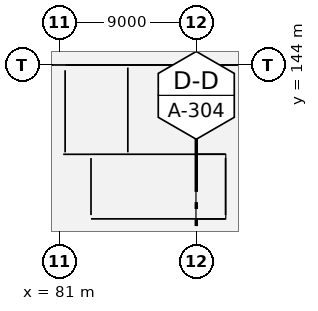
"""IFC4 building model, lengths in metres.
Left out: names, types, materials, properties, quantities, classifications, styles, units other than length and angle.
Written with IfcOpenShell. Run it as: python <this file> out.ifc"""

import sys

from ifc_helpers import new_model, si_unit, direction, frame, frame_2d, origin, origin_2d, place, context, subcontext, project, spatial, rectangle, extrude, element, fill, save


model = new_model("IFC4")
c1 = context("Model", 3, precision=1e-05, world=origin(), true_north=direction((0.0, 1.0)))
c2 = subcontext(c1, "Body", "Model", "MODEL_VIEW")
j1 = project(units=[si_unit("LENGTHUNIT", "METRE"), si_unit("PLANEANGLEUNIT", "RADIAN")], contexts=[c1])
p1 = place(None, origin())
s1 = spatial("IfcSite", under=j1, at=p1, CompositionType="ELEMENT")
p2 = place(p1, origin())
s2 = spatial("IfcBuilding", under=s1, at=p2, CompositionType="ELEMENT")
p3 = place(p2, origin())
s3 = spatial("IfcBuildingStorey", under=s2, at=p3, CompositionType="ELEMENT", Elevation=0.0)
for number, where, z_axis, x_axis in (
    (1, (81.0, 144.0, -0.5), (0.0, 0.0, 1.0), (1.0, 0.0, 0.0)),
    (2, (90.0, 144.0, -0.5), (0.0, 0.0, 1.0), (1.0, 0.0, 0.0)),
):
    element("IfcColumn", number, at=place(p3, frame(where, z_axis=z_axis, x_axis=x_axis)), inside=s3, PredefinedType="COLUMN", context=c2, shape_type="SweptSolid", body=[
        extrude(rectangle(XDim=0.8, YDim=0.7, at=origin_2d()), origin(), (0.0, 0.0, 1.0), 6.8),
    ])
p4 = place(p3, frame((72.575, 144.0, 0.0), z_axis=(0.0, 0.0, 1.0), x_axis=(1.0, 0.0, 0.0)))
e3 = element("IfcWall", 3, at=p4, inside=s3, PredefinedType="SOLIDWALL", context=c2, shape_type="SweptSolid", body=[
    extrude(rectangle(XDim=8.025, YDim=0.34, at=frame_2d((4.013, 0.0))), origin(), (0.0, 0.0, 1.0), 5.12),
])
p5 = place(p4, frame((2.812, 0.0, 0.0)))
e4 = element("IfcOpeningElement", 4, at=p5, cuts=e3, PredefinedType="OPENING", context=c2, shape_type="SweptSolid", body=[
    extrude(rectangle(XDim=2.4, YDim=3.1, at=frame_2d((1.2, 1.55))), frame((0.0, 0.18, 0.0), z_axis=(0.0, -1.0, 0.0), x_axis=(1.0, 0.0, 0.0)), (0.0, 0.0, 1.0), 0.36),
])
p6 = place(p3, frame((81.4, 144.0, 0.0), z_axis=(0.0, 0.0, 1.0), x_axis=(1.0, 0.0, 0.0)))
e5 = element("IfcWall", 5, at=p6, inside=s3, PredefinedType="SOLIDWALL", context=c2, shape_type="SweptSolid", body=[
    extrude(rectangle(XDim=8.2, YDim=0.34, at=frame_2d((4.1, 0.0))), origin(), (0.0, 0.0, 1.0), 5.12),
])
p7 = place(p6, frame((1.533, 0.0, 0.9)))
e6 = element("IfcOpeningElement", 6, at=p7, cuts=e5, PredefinedType="OPENING", context=c2, shape_type="SweptSolid", body=[
    extrude(rectangle(XDim=2.4, YDim=3.5, at=frame_2d((1.2, 1.75))), frame((0.0, 0.18, 0.0), z_axis=(0.0, -1.0, 0.0), x_axis=(1.0, 0.0, 0.0)), (0.0, 0.0, 1.0), 0.36),
])
p8 = place(p6, frame((4.267, 0.0, 0.9)))
e7 = element("IfcOpeningElement", 7, at=p8, cuts=e5, PredefinedType="OPENING", context=c2, shape_type="SweptSolid", body=[
    extrude(rectangle(XDim=2.4, YDim=3.5, at=frame_2d((1.2, 1.75))), frame((0.0, 0.18, 0.0), z_axis=(0.0, -1.0, 0.0), x_axis=(1.0, 0.0, 0.0)), (0.0, 0.0, 1.0), 0.36),
])
p9 = place(p6, frame((0.2, 0.0, 0.0)))
e8 = element("IfcOpeningElement", 8, at=p9, cuts=e5, PredefinedType="OPENING", context=c2, shape_type="SweptSolid", body=[
    extrude(rectangle(XDim=1.2, YDim=2.25, at=frame_2d((0.6, 1.125))), frame((0.0, 0.18, 0.0), z_axis=(0.0, -1.0, 0.0), x_axis=(1.0, 0.0, 0.0)), (0.0, 0.0, 1.0), 0.36),
])
p10 = place(p3, frame((90.4, 144.0, 0.0), z_axis=(0.0, 0.0, 1.0), x_axis=(1.0, 0.0, 0.0)))
e9 = element("IfcWall", 9, at=p10, inside=s3, PredefinedType="SOLIDWALL", context=c2, shape_type="SweptSolid", body=[
    extrude(rectangle(XDim=8.2, YDim=0.34, at=frame_2d((4.1, 0.0))), origin(), (0.0, 0.0, 1.0), 5.12),
])
p11 = place(p10, frame((2.9, 0.0, 0.0)))
e10 = element("IfcOpeningElement", 10, at=p11, cuts=e9, PredefinedType="OPENING", context=c2, shape_type="SweptSolid", body=[
    extrude(rectangle(XDim=2.4, YDim=3.1, at=frame_2d((1.2, 1.55))), frame((0.0, 0.18, 0.0), z_axis=(0.0, -1.0, 0.0), x_axis=(1.0, 0.0, 0.0)), (0.0, 0.0, 1.0), 0.36),
])
p12 = place(p3, frame((83.075, 133.875, -0.5), z_axis=(0.0, 0.0, 1.0), x_axis=(1.0, 0.0, 0.0)))
e11 = element("IfcWall", 11, at=p12, inside=s3, PredefinedType="SOLIDWALL", context=c2, shape_type="SweptSolid", body=[
    extrude(rectangle(XDim=8.85, YDim=0.25, at=frame_2d((4.425, 0.0))), origin(), (0.0, 0.0, 1.0), 6.8),
])
p13 = place(p3, frame((83.075, 138.125, -0.5), z_axis=(0.0, 0.0, 1.0), x_axis=(1.0, 0.0, 0.0)))
e12 = element("IfcWall", 12, at=p13, inside=s3, PredefinedType="SOLIDWALL", context=c2, shape_type="SweptSolid", body=[
    extrude(rectangle(XDim=8.85, YDim=0.25, at=frame_2d((4.425, 0.0))), origin(), (0.0, 0.0, 1.0), 6.8),
])
p14 = place(p13, frame((0.425, 0.0, 0.5)))
e13 = element("IfcOpeningElement", 13, at=p14, cuts=e12, PredefinedType="OPENING", context=c2, shape_type="SweptSolid", body=[
    extrude(rectangle(XDim=1.2, YDim=2.2, at=frame_2d((0.6, 1.1))), frame((0.0, 0.135, 0.0), z_axis=(0.0, -1.0, 0.0), x_axis=(1.0, 0.0, 0.0)), (0.0, 0.0, 1.0), 0.27),
])
p15 = place(p3, frame((83.075, 134.125, -0.5), z_axis=(0.0, 0.0, 1.0), x_axis=(0.0, 1.0, 0.0)))
e14 = element("IfcWall", 14, at=p15, inside=s3, PredefinedType="SOLIDWALL", context=c2, shape_type="SweptSolid", body=[
    extrude(rectangle(XDim=3.75, YDim=0.25, at=frame_2d((1.875, 0.0))), origin(), (0.0, 0.0, 1.0), 6.8),
])
p16 = place(p15, frame((1.1, 0.0, 0.5)))
e15 = element("IfcOpeningElement", 15, at=p16, cuts=e14, PredefinedType="OPENING", context=c2, shape_type="SweptSolid", body=[
    extrude(rectangle(XDim=1.2, YDim=2.2, at=frame_2d((0.6, 1.1))), frame((0.0, 0.135, 0.0), z_axis=(0.0, -1.0, 0.0), x_axis=(1.0, 0.0, 0.0)), (0.0, 0.0, 1.0), 0.27),
])
p17 = place(p3, frame((91.925, 134.125, -0.5), z_axis=(0.0, 0.0, 1.0), x_axis=(0.0, 1.0, 0.0)))
e16 = element("IfcWall", 16, at=p17, inside=s3, PredefinedType="SOLIDWALL", context=c2, shape_type="SweptSolid", body=[
    extrude(rectangle(XDim=3.75, YDim=0.25, at=frame_2d((1.875, 0.0))), origin(), (0.0, 0.0, 1.0), 6.8),
])
p18 = place(p3, frame((81.373, 138.25, 0.0), z_axis=(0.0, 0.0, 1.0), x_axis=(0.0, 1.0, 0.0)))
e17 = element("IfcWall", 17, at=p18, inside=s3, PredefinedType="STANDARD", context=c2, shape_type="SweptSolid", body=[
    extrude(rectangle(XDim=5.4, YDim=0.255, at=frame_2d((2.7, 0.0))), origin(), (0.0, 0.0, 1.0), 5.95),
])
p19 = place(p3, frame((85.498, 138.25, 0.0), z_axis=(0.0, 0.0, 1.0), x_axis=(0.0, 1.0, 0.0)))
e18 = element("IfcWall", 18, at=p19, inside=s3, PredefinedType="STANDARD", context=c2, shape_type="SweptSolid", body=[
    extrude(rectangle(XDim=5.58, YDim=0.255, at=frame_2d((2.79, 0.0))), origin(), (0.0, 0.0, 1.0), 5.95),
])
p20 = place(p3, frame((81.245, 138.123, 0.0), z_axis=(0.0, 0.0, 1.0), x_axis=(1.0, 0.0, 0.0)))
e19 = element("IfcWall", 19, at=p20, inside=s3, PredefinedType="STANDARD", context=c2, shape_type="SweptSolid", body=[
    extrude(rectangle(XDim=1.83, YDim=0.255, at=frame_2d((0.915, 0.0))), origin(), (0.0, 0.0, 1.0), 5.95),
])
p21 = place(p7, origin())
e20 = element("IfcWindow", 20, at=p21, inside=s3, PartitioningType="TRIPLE_PANEL_VERTICAL", PredefinedType="WINDOW", context=c2, shape_type="SweptSolid", body=[
    extrude(rectangle(XDim=2.4, YDim=3.5, at=frame_2d((1.2, 1.75))), frame((0.0, 0.03, 0.0), z_axis=(0.0, -1.0, 0.0), x_axis=(1.0, 0.0, 0.0)), (0.0, 0.0, 1.0), 0.06),
])
fill(e6, e20)
p22 = place(p8, origin())
e21 = element("IfcWindow", 21, at=p22, inside=s3, PartitioningType="TRIPLE_PANEL_VERTICAL", PredefinedType="WINDOW", context=c2, shape_type="SweptSolid", body=[
    extrude(rectangle(XDim=2.4, YDim=3.5, at=frame_2d((1.2, 1.75))), frame((0.0, 0.03, 0.0), z_axis=(0.0, -1.0, 0.0), x_axis=(1.0, 0.0, 0.0)), (0.0, 0.0, 1.0), 0.06),
])
fill(e7, e21)
p23 = place(p16, origin())
e22 = element("IfcDoor", 22, at=p23, inside=s3, OperationType="SINGLE_SWING_RIGHT", PredefinedType="DOOR", context=c2, shape_type="SweptSolid", body=[
    extrude(rectangle(XDim=1.2, YDim=2.2, at=frame_2d((0.6, 1.1))), frame((0.0, 0.025, 0.0), z_axis=(0.0, -1.0, 0.0), x_axis=(1.0, 0.0, 0.0)), (0.0, 0.0, 1.0), 0.05),
])
fill(e15, e22)
p24 = place(p14, origin())
e23 = element("IfcDoor", 23, at=p24, inside=s3, OperationType="SINGLE_SWING_LEFT", PredefinedType="DOOR", context=c2, shape_type="SweptSolid", body=[
    extrude(rectangle(XDim=1.2, YDim=2.2, at=frame_2d((0.6, 1.1))), frame((0.0, 0.025, 0.0), z_axis=(0.0, -1.0, 0.0), x_axis=(1.0, 0.0, 0.0)), (0.0, 0.0, 1.0), 0.05),
])
fill(e13, e23)
p25 = place(p9, origin())
e24 = element("IfcDoor", 24, at=p25, inside=s3, OperationType="SINGLE_SWING_LEFT", PredefinedType="DOOR", context=c2, shape_type="SweptSolid", body=[
    extrude(rectangle(XDim=1.2, YDim=2.25, at=frame_2d((0.6, 1.125))), frame((0.0, 0.025, 0.0), z_axis=(0.0, -1.0, 0.0), x_axis=(1.0, 0.0, 0.0)), (0.0, 0.0, 1.0), 0.05),
])
fill(e8, e24)
save(model, sys.argv[1])
